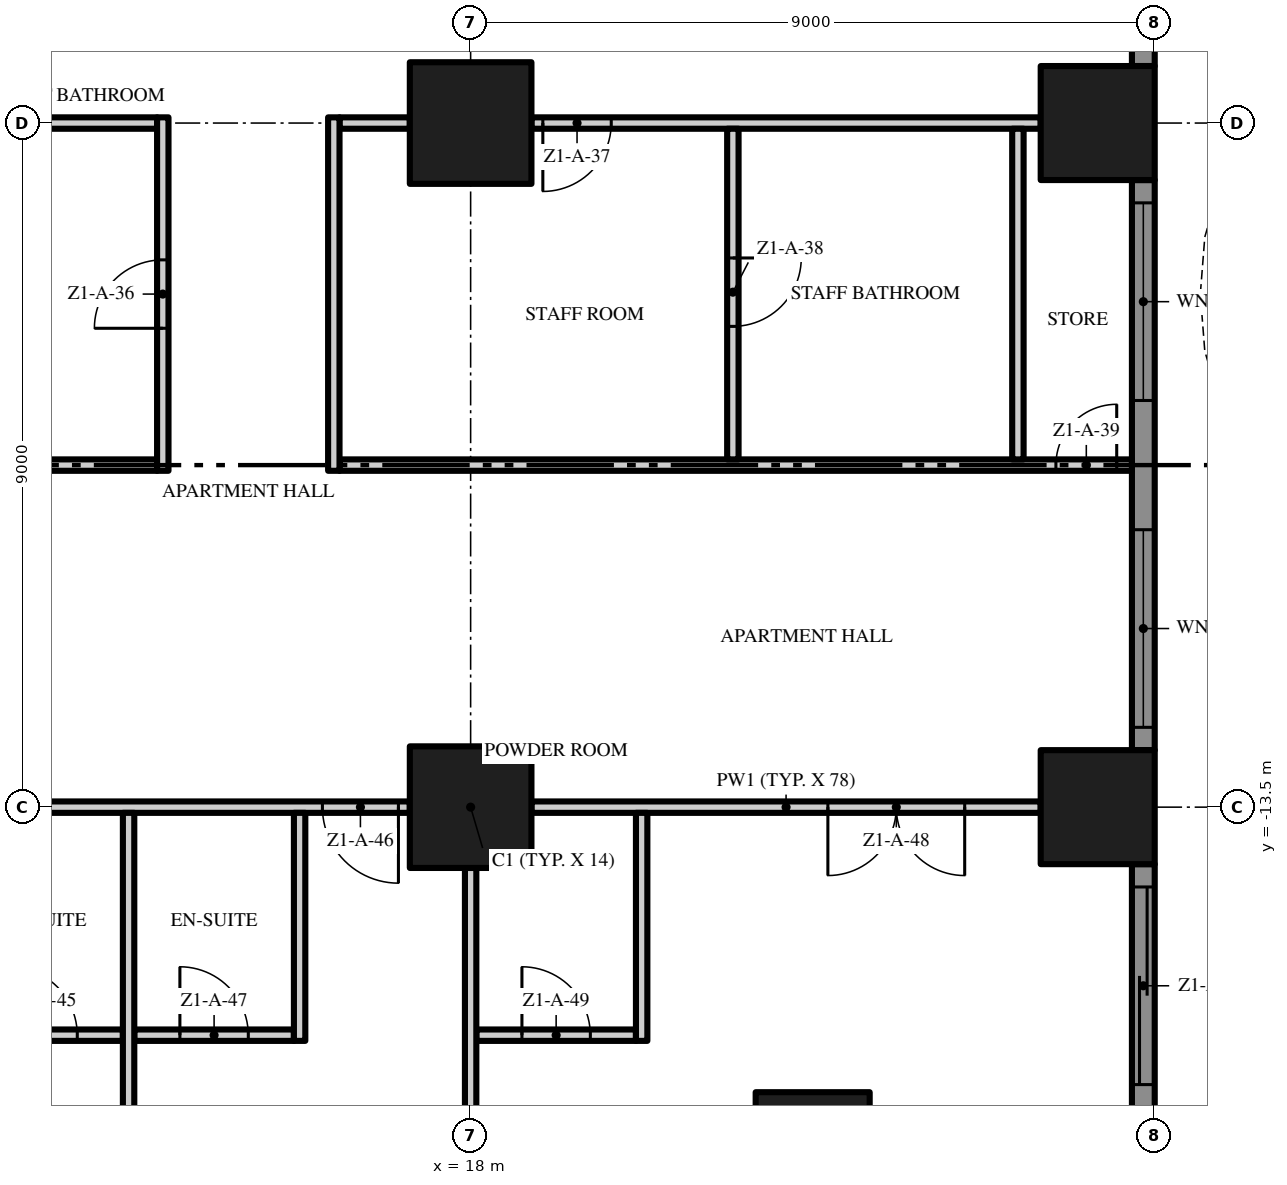
"""IFC4 building model, lengths in metres.
Left out: names, types, materials, properties, quantities, classifications, styles, units other than length and angle.
Written with IfcOpenShell. Run it as: python <this file> out.ifc"""

import sys

from ifc_helpers import new_model, si_unit, direction, frame, frame_2d, origin, origin_2d, place, context, subcontext, project, spatial, polyline, rectangle, outline, extrude, element, fill, save


model = new_model("IFC4")
c1 = context("Model", 3, precision=1e-05, world=origin(), true_north=direction((0.0, 1.0)))
c2 = subcontext(c1, "Body", "Model", "MODEL_VIEW")
j1 = project(units=[si_unit("LENGTHUNIT", "METRE"), si_unit("PLANEANGLEUNIT", "RADIAN")], contexts=[c1])
p1 = place(None, origin())
s1 = spatial("IfcSite", under=j1, at=p1, CompositionType="ELEMENT")
p2 = place(p1, origin())
s2 = spatial("IfcBuilding", under=s1, at=p2, CompositionType="ELEMENT")
p3 = place(p2, frame((0.0, 0.0, 15.0)))
s3 = spatial("IfcBuildingStorey", under=s2, at=p3, CompositionType="ELEMENT", Elevation=15.0)
for number, where, z_axis, x_axis in (
    (1, (18.0, -13.5, 0.0), (0.0, 0.0, 1.0), (1.0, 0.0, 0.0)),
    (2, (18.0, -4.5, 0.0), (0.0, 0.0, 1.0), (1.0, 0.0, 0.0)),
):
    element("IfcColumn", number, at=place(p3, frame(where, z_axis=z_axis, x_axis=x_axis)), inside=s3, PredefinedType="COLUMN", context=c2, shape_type="SweptSolid", body=[
        extrude(rectangle(XDim=1.6, YDim=1.6, at=origin_2d()), origin(), (0.0, 0.0, 1.0), 3.5),
    ])
for number, where, z_axis, x_axis in (
    (3, (26.25, -13.5, 0.0), (0.0, 0.0, 1.0), (1.0, 0.0, 0.0)),
    (4, (22.5, -18.0, 0.0), (0.0, 0.0, 1.0), (1.0, 0.0, 0.0)),
    (5, (26.25, -4.5, 0.0), (0.0, 0.0, 1.0), (1.0, 0.0, 0.0)),
):
    element("IfcColumn", number, at=place(p3, frame(where, z_axis=z_axis, x_axis=x_axis)), inside=s3, PredefinedType="COLUMN", context=c2, shape_type="SweptSolid", body=[
        extrude(rectangle(XDim=1.5, YDim=1.5, at=origin_2d()), origin(), (0.0, 0.0, 1.0), 3.5),
    ])
p4 = place(p3, frame((26.85, -14.25, 0.0), z_axis=(0.0, 0.0, 1.0), x_axis=(0.0, -1.0, 0.0)))
e6 = element("IfcWall", 6, at=p4, inside=s3, PredefinedType="SOLIDWALL", context=c2, shape_type="SweptSolid", body=[
    extrude(rectangle(XDim=3.45, YDim=0.3, at=frame_2d((1.725, 0.0))), origin(), (0.0, 0.0, 1.0), 3.5),
])
p5 = place(p4, frame((0.3, 0.0, 0.0)))
e7 = element("IfcOpeningElement", 7, at=p5, cuts=e6, PredefinedType="OPENING", context=c2, shape_type="SweptSolid", body=[
    extrude(rectangle(XDim=2.6, YDim=2.4, at=frame_2d((1.3, 1.2))), frame((0.0, 0.16, 0.0), z_axis=(0.0, -1.0, 0.0), x_axis=(1.0, 0.0, 0.0)), (0.0, 0.0, 1.0), 0.32),
])
p6 = place(p3, frame((26.85, -5.25, 0.0), z_axis=(0.0, 0.0, 1.0), x_axis=(0.0, -1.0, 0.0)))
e8 = element("IfcWall", 8, at=p6, inside=s3, PredefinedType="SOLIDWALL", context=c2, shape_type="SweptSolid", body=[
    extrude(rectangle(XDim=7.5, YDim=0.3, at=frame_2d((3.75, 0.0))), origin(), (0.0, 0.0, 1.0), 3.5),
])
p7 = place(p6, frame((4.6, 0.0, 0.45)))
e9 = element("IfcOpeningElement", 9, at=p7, cuts=e8, PredefinedType="OPENING", context=c2, shape_type="SweptSolid", body=[
    extrude(rectangle(XDim=2.6, YDim=2.65, at=frame_2d((1.3, 1.325))), frame((0.0, 0.16, 0.0), z_axis=(0.0, -1.0, 0.0), x_axis=(1.0, 0.0, 0.0)), (0.0, 0.0, 1.0), 0.32),
])
p8 = place(p6, frame((0.3, 0.0, 0.45)))
e10 = element("IfcOpeningElement", 10, at=p8, cuts=e8, PredefinedType="OPENING", context=c2, shape_type="SweptSolid", body=[
    extrude(rectangle(XDim=2.6, YDim=2.65, at=frame_2d((1.3, 1.325))), frame((0.0, 0.16, 0.0), z_axis=(0.0, -1.0, 0.0), x_axis=(1.0, 0.0, 0.0)), (0.0, 0.0, 1.0), 0.32),
])
p9 = place(p3, frame((26.85, 3.75, 0.0), z_axis=(0.0, 0.0, 1.0), x_axis=(0.0, -1.0, 0.0)))
e11 = element("IfcWall", 11, at=p9, inside=s3, PredefinedType="SOLIDWALL", context=c2, shape_type="SweptSolid", body=[
    extrude(rectangle(XDim=7.5, YDim=0.3, at=frame_2d((3.75, 0.0))), origin(), (0.0, 0.0, 1.0), 3.5),
])
p10 = place(p9, frame((4.6, 0.0, 0.45)))
e12 = element("IfcOpeningElement", 12, at=p10, cuts=e11, PredefinedType="OPENING", context=c2, shape_type="SweptSolid", body=[
    extrude(rectangle(XDim=2.6, YDim=2.65, at=frame_2d((1.3, 1.325))), frame((0.0, 0.16, 0.0), z_axis=(0.0, -1.0, 0.0), x_axis=(1.0, 0.0, 0.0)), (0.0, 0.0, 1.0), 0.32),
])
p11 = place(p9, frame((0.3, 0.0, 0.0)))
e13 = element("IfcOpeningElement", 13, at=p11, cuts=e11, PredefinedType="OPENING", context=c2, shape_type="SweptSolid", body=[
    extrude(rectangle(XDim=2.6, YDim=2.4, at=frame_2d((1.3, 1.2))), frame((0.0, 0.16, 0.0), z_axis=(0.0, -1.0, 0.0), x_axis=(1.0, 0.0, 0.0)), (0.0, 0.0, 1.0), 0.32),
])
p12 = place(p3, origin())
e14 = element("IfcWall", 14, at=p12, inside=s3, PredefinedType="USERDEFINED", context=c2, shape_type="SweptSolid", body=[
    extrude(outline(polyline([(28.8, -18.0), (29.505, -16.5), (29.941, -15.0), (30.0, -14.25), (29.941, -13.5), (29.505, -12.0), (28.8, -10.5), (28.095, -9.0), (27.659, -7.5), (27.6, -6.75), (27.659, -6.0), (28.095, -4.5), (28.8, -3.0), (29.505, -1.5), (29.941, 0.0), (30.0, 0.75), (29.941, 1.5), (29.505, 3.0), (28.8, 4.5), (28.095, 6.0), (27.659, 7.5), (27.6, 8.25), (27.659, 9.0), (28.095, 10.5), (28.8, 12.0), (29.505, 13.5), (29.941, 15.0), (30.0, 15.75), (29.941, 16.5), (29.505, 18.0), (29.265, 17.93), (29.694, 16.455), (29.749, 15.75), (29.694, 15.045), (29.271, 13.589), (28.574, 12.106), (27.86, 10.589), (27.411, 9.045), (27.349, 8.25), (27.411, 7.455), (27.86, 5.911), (28.574, 4.394), (29.271, 2.911), (29.694, 1.455), (29.749, 0.75), (29.694, 0.045), (29.271, -1.411), (28.574, -2.894), (27.86, -4.411), (27.411, -5.955), (27.349, -6.75), (27.411, -7.545), (27.86, -9.089), (28.574, -10.606), (29.271, -12.089), (29.694, -13.545), (29.749, -14.25), (29.694, -14.955), (29.271, -16.411), (28.574, -17.894), (28.8, -18.0)])), origin(), (0.0, 0.0, 1.0), 0.9),
])
p13 = place(p3, frame((11.325, -16.5, 0.0), z_axis=(0.0, 0.0, 1.0), x_axis=(1.0, 0.0, 0.0)))
e15 = element("IfcWall", 15, at=p13, inside=s3, PredefinedType="PARTITIONING", context=c2, shape_type="SweptSolid", body=[
    extrude(rectangle(XDim=2.1, YDim=0.15, at=frame_2d((1.05, 0.0))), origin(), (0.0, 0.0, 1.0), 3.5),
])
p14 = place(p13, frame((0.6, 0.0, 0.0)))
e16 = element("IfcOpeningElement", 16, at=p14, cuts=e15, PredefinedType="OPENING", context=c2, shape_type="SweptSolid", body=[
    extrude(rectangle(XDim=0.9, YDim=2.1, at=frame_2d((0.45, 1.05))), frame((0.0, 0.085, 0.0), z_axis=(0.0, -1.0, 0.0), x_axis=(1.0, 0.0, 0.0)), (0.0, 0.0, 1.0), 0.17),
])
p15 = place(p3, frame((13.575, -16.5, 0.0), z_axis=(0.0, 0.0, 1.0), x_axis=(1.0, 0.0, 0.0)))
e17 = element("IfcWall", 17, at=p15, inside=s3, PredefinedType="PARTITIONING", context=c2, shape_type="SweptSolid", body=[
    extrude(rectangle(XDim=2.1, YDim=0.15, at=frame_2d((1.05, 0.0))), origin(), (0.0, 0.0, 1.0), 3.5),
])
p16 = place(p15, frame((0.6, 0.0, 0.0)))
e18 = element("IfcOpeningElement", 18, at=p16, cuts=e17, PredefinedType="OPENING", context=c2, shape_type="SweptSolid", body=[
    extrude(rectangle(XDim=0.9, YDim=2.1, at=frame_2d((0.45, 1.05))), frame((0.0, 0.085, 0.0), z_axis=(0.0, -1.0, 0.0), x_axis=(1.0, 0.0, 0.0)), (0.0, 0.0, 1.0), 0.17),
])
p17 = place(p3, frame((18.075, -16.5, 0.0), z_axis=(0.0, 0.0, 1.0), x_axis=(1.0, 0.0, 0.0)))
e19 = element("IfcWall", 19, at=p17, inside=s3, PredefinedType="PARTITIONING", context=c2, shape_type="SweptSolid", body=[
    extrude(rectangle(XDim=2.1, YDim=0.15, at=frame_2d((1.05, 0.0))), origin(), (0.0, 0.0, 1.0), 3.5),
])
p18 = place(p17, frame((0.6, 0.0, 0.0)))
e20 = element("IfcOpeningElement", 20, at=p18, cuts=e19, PredefinedType="OPENING", context=c2, shape_type="SweptSolid", body=[
    extrude(rectangle(XDim=0.9, YDim=2.1, at=frame_2d((0.45, 1.05))), frame((0.0, 0.085, 0.0), z_axis=(0.0, -1.0, 0.0), x_axis=(1.0, 0.0, 0.0)), (0.0, 0.0, 1.0), 0.17),
])
p19 = place(p3, frame((17.2, -13.5, 0.0), z_axis=(0.0, 0.0, 1.0), x_axis=(-1.0, 0.0, 0.0)))
e21 = element("IfcWall", 21, at=p19, inside=s3, PredefinedType="PARTITIONING", context=c2, shape_type="SweptSolid", body=[
    extrude(rectangle(XDim=7.4, YDim=0.15, at=frame_2d((3.7, 0.0))), origin(), (0.0, 0.0, 1.0), 3.5),
])
p20 = place(p19, frame((6.25, 0.0, 0.0)))
e22 = element("IfcOpeningElement", 22, at=p20, cuts=e21, PredefinedType="OPENING", context=c2, shape_type="SweptSolid", body=[
    extrude(rectangle(XDim=1.0, YDim=2.4, at=frame_2d((0.5, 1.2))), frame((0.0, 0.085, 0.0), z_axis=(0.0, -1.0, 0.0), x_axis=(1.0, 0.0, 0.0)), (0.0, 0.0, 1.0), 0.17),
])
p21 = place(p19, frame((0.15, 0.0, 0.0)))
e23 = element("IfcOpeningElement", 23, at=p21, cuts=e21, PredefinedType="OPENING", context=c2, shape_type="SweptSolid", body=[
    extrude(rectangle(XDim=1.0, YDim=2.4, at=frame_2d((0.5, 1.2))), frame((0.0, 0.085, 0.0), z_axis=(0.0, -1.0, 0.0), x_axis=(1.0, 0.0, 0.0)), (0.0, 0.0, 1.0), 0.17),
])
p22 = place(p3, frame((25.5, -13.5, 0.0), z_axis=(0.0, 0.0, 1.0), x_axis=(-1.0, 0.0, 0.0)))
e24 = element("IfcWall", 24, at=p22, inside=s3, PredefinedType="PARTITIONING", context=c2, shape_type="SweptSolid", body=[
    extrude(rectangle(XDim=6.7, YDim=0.15, at=frame_2d((3.35, 0.0))), origin(), (0.0, 0.0, 1.0), 3.5),
])
p23 = place(p22, frame((1.0, 0.0, 0.0)))
e25 = element("IfcOpeningElement", 25, at=p23, cuts=e24, PredefinedType="OPENING", context=c2, shape_type="SweptSolid", body=[
    extrude(rectangle(XDim=1.8, YDim=2.4, at=frame_2d((0.9, 1.2))), frame((0.0, 0.085, 0.0), z_axis=(0.0, -1.0, 0.0), x_axis=(1.0, 0.0, 0.0)), (0.0, 0.0, 1.0), 0.17),
])
p24 = place(p3, frame((0.1, -9.0, 0.0), z_axis=(0.0, 0.0, 1.0), x_axis=(1.0, 0.0, 0.0)))
e26 = element("IfcWall", 26, at=p24, inside=s3, PredefinedType="PARTITIONING", context=c2, shape_type="SweptSolid", body=[
    extrude(rectangle(XDim=13.775, YDim=0.15, at=frame_2d((6.888, 0.0))), origin(), (0.0, 0.0, 1.0), 3.5),
])
p25 = place(p24, frame((8.1, 0.0, 0.0)))
e27 = element("IfcOpeningElement", 27, at=p25, cuts=e26, PredefinedType="OPENING", context=c2, shape_type="SweptSolid", body=[
    extrude(rectangle(XDim=1.0, YDim=2.4, at=frame_2d((0.5, 1.2))), frame((0.0, 0.085, 0.0), z_axis=(0.0, -1.0, 0.0), x_axis=(1.0, 0.0, 0.0)), (0.0, 0.0, 1.0), 0.17),
])
p26 = place(p3, frame((16.275, -9.0, 0.0), z_axis=(0.0, 0.0, 1.0), x_axis=(1.0, 0.0, 0.0)))
e28 = element("IfcWall", 28, at=p26, inside=s3, PredefinedType="PARTITIONING", context=c2, shape_type="SweptSolid", body=[
    extrude(rectangle(XDim=10.425, YDim=0.15, at=frame_2d((5.213, 0.0))), origin(), (0.0, 0.0, 1.0), 3.5),
])
p27 = place(p26, frame((9.425, 0.0, 0.0)))
e29 = element("IfcOpeningElement", 29, at=p27, cuts=e28, PredefinedType="OPENING", context=c2, shape_type="SweptSolid", body=[
    extrude(rectangle(XDim=0.8, YDim=2.0, at=frame_2d((0.4, 1.0))), frame((0.0, 0.085, 0.0), z_axis=(0.0, -1.0, 0.0), x_axis=(1.0, 0.0, 0.0)), (0.0, 0.0, 1.0), 0.17),
])
p28 = place(p3, frame((9.8, -4.5, 0.0), z_axis=(0.0, 0.0, 1.0), x_axis=(1.0, 0.0, 0.0)))
e30 = element("IfcWall", 30, at=p28, inside=s3, PredefinedType="PARTITIONING", context=c2, shape_type="SweptSolid", body=[
    extrude(rectangle(XDim=4.075, YDim=0.15, at=frame_2d((2.038, 0.0))), origin(), (0.0, 0.0, 1.0), 3.5),
])
p29 = place(p3, frame((16.275, -4.5, 0.0), z_axis=(0.0, 0.0, 1.0), x_axis=(1.0, 0.0, 0.0)))
e31 = element("IfcWall", 31, at=p29, inside=s3, PredefinedType="PARTITIONING", context=c2, shape_type="SweptSolid", body=[
    extrude(rectangle(XDim=0.925, YDim=0.15, at=frame_2d((0.463, 0.0))), origin(), (0.0, 0.0, 1.0), 3.5),
])
p30 = place(p3, frame((25.5, -4.5, 0.0), z_axis=(0.0, 0.0, 1.0), x_axis=(-1.0, 0.0, 0.0)))
e32 = element("IfcWall", 32, at=p30, inside=s3, PredefinedType="PARTITIONING", context=c2, shape_type="SweptSolid", body=[
    extrude(rectangle(XDim=6.7, YDim=0.15, at=frame_2d((3.35, 0.0))), origin(), (0.0, 0.0, 1.0), 3.5),
])
p31 = place(p30, frame((5.65, 0.0, 0.0)))
e33 = element("IfcOpeningElement", 33, at=p31, cuts=e32, PredefinedType="OPENING", context=c2, shape_type="SweptSolid", body=[
    extrude(rectangle(XDim=0.9, YDim=2.1, at=frame_2d((0.45, 1.05))), frame((0.0, 0.085, 0.0), z_axis=(0.0, -1.0, 0.0), x_axis=(1.0, 0.0, 0.0)), (0.0, 0.0, 1.0), 0.17),
])
p32 = place(p3, frame((13.5, -22.2, 0.0), z_axis=(0.0, 0.0, 1.0), x_axis=(0.0, 1.0, 0.0)))
e34 = element("IfcWall", 34, at=p32, inside=s3, PredefinedType="PARTITIONING", context=c2, shape_type="SweptSolid", body=[
    extrude(rectangle(XDim=8.625, YDim=0.15, at=frame_2d((4.312, 0.0))), origin(), (0.0, 0.0, 1.0), 3.5),
])
p33 = place(p3, frame((13.95, -9.075, 0.0), z_axis=(0.0, 0.0, 1.0), x_axis=(0.0, 1.0, 0.0)))
e35 = element("IfcWall", 35, at=p33, inside=s3, PredefinedType="PARTITIONING", context=c2, shape_type="SweptSolid", body=[
    extrude(rectangle(XDim=4.65, YDim=0.15, at=frame_2d((2.325, 0.0))), origin(), (0.0, 0.0, 1.0), 3.5),
])
p34 = place(p33, frame((1.875, 0.0, 0.0)))
e36 = element("IfcOpeningElement", 36, at=p34, cuts=e35, PredefinedType="OPENING", context=c2, shape_type="SweptSolid", body=[
    extrude(rectangle(XDim=0.9, YDim=2.1, at=frame_2d((0.45, 1.05))), frame((0.0, 0.085, 0.0), z_axis=(0.0, -1.0, 0.0), x_axis=(1.0, 0.0, 0.0)), (0.0, 0.0, 1.0), 0.17),
])
p35 = place(p3, frame((15.75, -16.575, 0.0), z_axis=(0.0, 0.0, 1.0), x_axis=(0.0, 1.0, 0.0)))
e37 = element("IfcWall", 37, at=p35, inside=s3, PredefinedType="PARTITIONING", context=c2, shape_type="SweptSolid", body=[
    extrude(rectangle(XDim=3.0, YDim=0.15, at=frame_2d((1.5, 0.0))), origin(), (0.0, 0.0, 1.0), 3.5),
])
p36 = place(p3, frame((16.2, -9.075, 0.0), z_axis=(0.0, 0.0, 1.0), x_axis=(0.0, 1.0, 0.0)))
e38 = element("IfcWall", 38, at=p36, inside=s3, PredefinedType="PARTITIONING", context=c2, shape_type="SweptSolid", body=[
    extrude(rectangle(XDim=4.65, YDim=0.15, at=frame_2d((2.325, 0.0))), origin(), (0.0, 0.0, 1.0), 3.5),
])
p37 = place(p3, frame((18.0, -21.0, 0.0), z_axis=(0.0, 0.0, 1.0), x_axis=(0.0, 1.0, 0.0)))
e39 = element("IfcWall", 39, at=p37, inside=s3, PredefinedType="PARTITIONING", context=c2, shape_type="SweptSolid", body=[
    extrude(rectangle(XDim=6.7, YDim=0.15, at=frame_2d((3.35, 0.0))), origin(), (0.0, 0.0, 1.0), 3.5),
])
p38 = place(p3, frame((20.25, -16.575, 0.0), z_axis=(0.0, 0.0, 1.0), x_axis=(0.0, 1.0, 0.0)))
e40 = element("IfcWall", 40, at=p38, inside=s3, PredefinedType="PARTITIONING", context=c2, shape_type="SweptSolid", body=[
    extrude(rectangle(XDim=3.0, YDim=0.15, at=frame_2d((1.5, 0.0))), origin(), (0.0, 0.0, 1.0), 3.5),
])
p39 = place(p3, frame((21.45, -4.575, 0.0), z_axis=(0.0, 0.0, 1.0), x_axis=(0.0, -1.0, 0.0)))
e41 = element("IfcWall", 41, at=p39, inside=s3, PredefinedType="PARTITIONING", context=c2, shape_type="SweptSolid", body=[
    extrude(rectangle(XDim=4.35, YDim=0.15, at=frame_2d((2.175, 0.0))), origin(), (0.0, 0.0, 1.0), 3.5),
])
p40 = place(p39, frame((1.7, 0.0, 0.0)))
e42 = element("IfcOpeningElement", 42, at=p40, cuts=e41, PredefinedType="OPENING", context=c2, shape_type="SweptSolid", body=[
    extrude(rectangle(XDim=0.9, YDim=2.1, at=frame_2d((0.45, 1.05))), frame((0.0, 0.085, 0.0), z_axis=(0.0, -1.0, 0.0), x_axis=(1.0, 0.0, 0.0)), (0.0, 0.0, 1.0), 0.17),
])
p41 = place(p3, frame((25.2, -8.925, 0.0), z_axis=(0.0, 0.0, 1.0), x_axis=(0.0, 1.0, 0.0)))
e43 = element("IfcWall", 43, at=p41, inside=s3, PredefinedType="PARTITIONING", context=c2, shape_type="SweptSolid", body=[
    extrude(rectangle(XDim=4.35, YDim=0.15, at=frame_2d((2.175, 0.0))), origin(), (0.0, 0.0, 1.0), 3.5),
])
p42 = place(p5, origin())
e44 = element("IfcDoor", 44, at=p42, inside=s3, OperationType="SINGLE_SWING_LEFT", PredefinedType="DOOR", context=c2, shape_type="SweptSolid", body=[
    extrude(rectangle(XDim=2.6, YDim=2.4, at=frame_2d((1.3, 1.2))), frame((0.0, 0.025, 0.0), z_axis=(0.0, -1.0, 0.0), x_axis=(1.0, 0.0, 0.0)), (0.0, 0.0, 1.0), 0.05),
])
fill(e7, e44)
p43 = place(p7, origin())
e45 = element("IfcWindow", 45, at=p43, inside=s3, PartitioningType="SINGLE_PANEL", PredefinedType="WINDOW", context=c2, shape_type="SweptSolid", body=[
    extrude(rectangle(XDim=2.6, YDim=2.65, at=frame_2d((1.3, 1.325))), frame((0.0, 0.03, 0.0), z_axis=(0.0, -1.0, 0.0), x_axis=(1.0, 0.0, 0.0)), (0.0, 0.0, 1.0), 0.06),
])
fill(e9, e45)
p44 = place(p8, origin())
e46 = element("IfcWindow", 46, at=p44, inside=s3, PartitioningType="SINGLE_PANEL", PredefinedType="WINDOW", context=c2, shape_type="SweptSolid", body=[
    extrude(rectangle(XDim=2.6, YDim=2.65, at=frame_2d((1.3, 1.325))), frame((0.0, 0.03, 0.0), z_axis=(0.0, -1.0, 0.0), x_axis=(1.0, 0.0, 0.0)), (0.0, 0.0, 1.0), 0.06),
])
fill(e10, e46)
p45 = place(p34, origin())
e47 = element("IfcDoor", 47, at=p45, inside=s3, OperationType="SINGLE_SWING_LEFT", PredefinedType="DOOR", context=c2, shape_type="SweptSolid", body=[
    extrude(rectangle(XDim=0.9, YDim=2.1, at=frame_2d((0.45, 1.05))), frame((0.0, 0.025, 0.0), z_axis=(0.0, -1.0, 0.0), x_axis=(1.0, 0.0, 0.0)), (0.0, 0.0, 1.0), 0.05),
])
fill(e36, e47)
p46 = place(p31, origin())
e48 = element("IfcDoor", 48, at=p46, inside=s3, OperationType="SINGLE_SWING_RIGHT", PredefinedType="DOOR", context=c2, shape_type="SweptSolid", body=[
    extrude(rectangle(XDim=0.9, YDim=2.1, at=frame_2d((0.45, 1.05))), frame((0.0, 0.025, 0.0), z_axis=(0.0, -1.0, 0.0), x_axis=(1.0, 0.0, 0.0)), (0.0, 0.0, 1.0), 0.05),
])
fill(e33, e48)
p47 = place(p40, origin())
e49 = element("IfcDoor", 49, at=p47, inside=s3, OperationType="SINGLE_SWING_LEFT", PredefinedType="DOOR", context=c2, shape_type="SweptSolid", body=[
    extrude(rectangle(XDim=0.9, YDim=2.1, at=frame_2d((0.45, 1.05))), frame((0.0, 0.025, 0.0), z_axis=(0.0, -1.0, 0.0), x_axis=(1.0, 0.0, 0.0)), (0.0, 0.0, 1.0), 0.05),
])
fill(e42, e49)
p48 = place(p27, origin())
e50 = element("IfcDoor", 50, at=p48, inside=s3, OperationType="SINGLE_SWING_RIGHT", PredefinedType="DOOR", context=c2, shape_type="SweptSolid", body=[
    extrude(rectangle(XDim=0.8, YDim=2.0, at=frame_2d((0.4, 1.0))), frame((0.0, 0.025, 0.0), z_axis=(0.0, -1.0, 0.0), x_axis=(1.0, 0.0, 0.0)), (0.0, 0.0, 1.0), 0.05),
])
fill(e29, e50)
p49 = place(p14, origin())
e51 = element("IfcDoor", 51, at=p49, inside=s3, OperationType="SINGLE_SWING_LEFT", PredefinedType="DOOR", context=c2, shape_type="SweptSolid", body=[
    extrude(rectangle(XDim=0.9, YDim=2.1, at=frame_2d((0.45, 1.05))), frame((0.0, 0.025, 0.0), z_axis=(0.0, -1.0, 0.0), x_axis=(1.0, 0.0, 0.0)), (0.0, 0.0, 1.0), 0.05),
])
fill(e16, e51)
p50 = place(p21, origin())
e52 = element("IfcDoor", 52, at=p50, inside=s3, OperationType="SINGLE_SWING_LEFT", PredefinedType="DOOR", context=c2, shape_type="SweptSolid", body=[
    extrude(rectangle(XDim=1.0, YDim=2.4, at=frame_2d((0.5, 1.2))), frame((0.0, 0.025, 0.0), z_axis=(0.0, -1.0, 0.0), x_axis=(1.0, 0.0, 0.0)), (0.0, 0.0, 1.0), 0.05),
])
fill(e23, e52)
p51 = place(p16, origin())
e53 = element("IfcDoor", 53, at=p51, inside=s3, OperationType="SINGLE_SWING_LEFT", PredefinedType="DOOR", context=c2, shape_type="SweptSolid", body=[
    extrude(rectangle(XDim=0.9, YDim=2.1, at=frame_2d((0.45, 1.05))), frame((0.0, 0.025, 0.0), z_axis=(0.0, -1.0, 0.0), x_axis=(1.0, 0.0, 0.0)), (0.0, 0.0, 1.0), 0.05),
])
fill(e18, e53)
p52 = place(p23, origin())
e54 = element("IfcDoor", 54, at=p52, inside=s3, OperationType="DOUBLE_DOOR_SINGLE_SWING", PredefinedType="DOOR", context=c2, shape_type="SweptSolid", body=[
    extrude(rectangle(XDim=1.8, YDim=2.4, at=frame_2d((0.9, 1.2))), frame((0.0, 0.025, 0.0), z_axis=(0.0, -1.0, 0.0), x_axis=(1.0, 0.0, 0.0)), (0.0, 0.0, 1.0), 0.05),
])
fill(e25, e54)
p53 = place(p18, origin())
e55 = element("IfcDoor", 55, at=p53, inside=s3, OperationType="SINGLE_SWING_LEFT", PredefinedType="DOOR", context=c2, shape_type="SweptSolid", body=[
    extrude(rectangle(XDim=0.9, YDim=2.1, at=frame_2d((0.45, 1.05))), frame((0.0, 0.025, 0.0), z_axis=(0.0, -1.0, 0.0), x_axis=(1.0, 0.0, 0.0)), (0.0, 0.0, 1.0), 0.05),
])
fill(e20, e55)
save(model, sys.argv[1])
